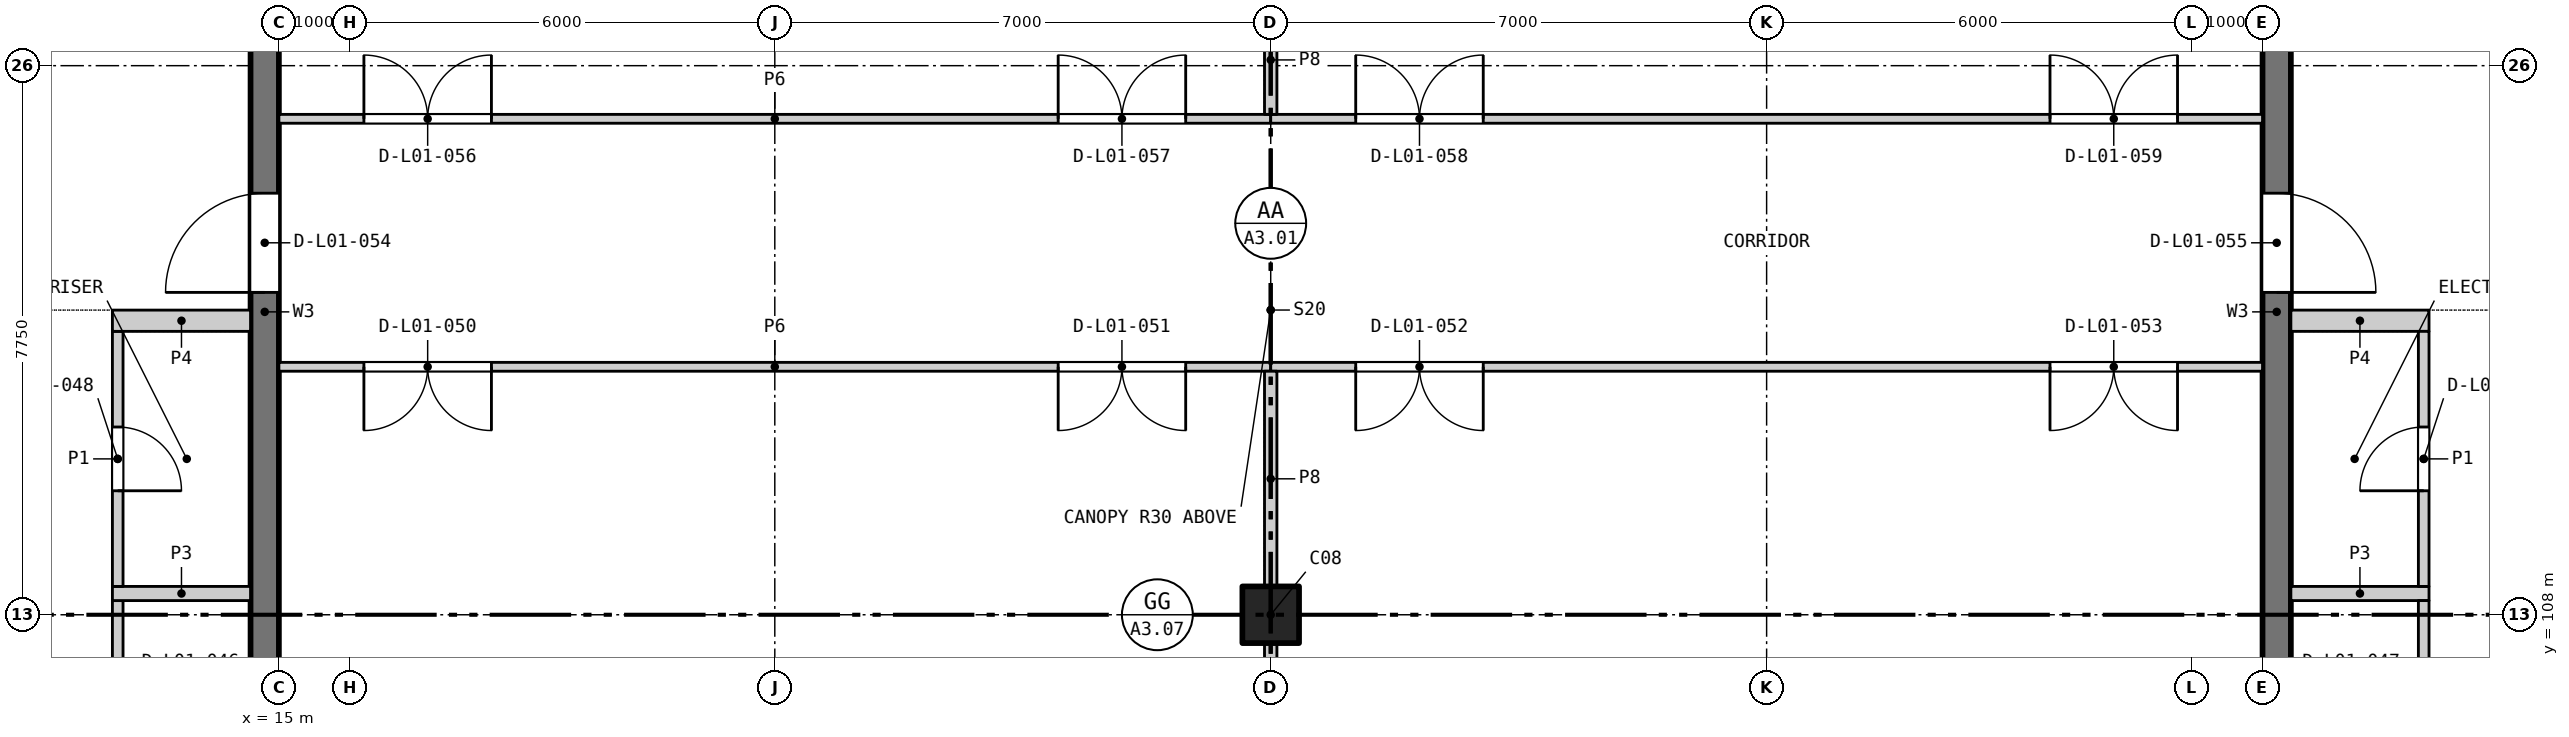
"""IFC4 building model, lengths in metres.
Left out: names, types, materials, properties, quantities, classifications, styles, units other than length and angle.
Written with IfcOpenShell. Run it as: python <this file> out.ifc"""

import sys

from ifc_helpers import new_model, si_unit, direction, frame, frame_2d, origin, origin_2d, place, context, subcontext, project, spatial, rectangle, extrude, element, fill, save


model = new_model("IFC4")
c1 = context("Model", 3, precision=1e-05, world=origin(), true_north=direction((0.0, 1.0)))
c2 = subcontext(c1, "Body", "Model", "MODEL_VIEW")
j1 = project(units=[si_unit("LENGTHUNIT", "METRE"), si_unit("PLANEANGLEUNIT", "RADIAN")], contexts=[c1])
p1 = place(None, origin())
s1 = spatial("IfcSite", under=j1, at=p1, CompositionType="ELEMENT")
p2 = place(p1, origin())
s2 = spatial("IfcBuilding", under=s1, at=p2, CompositionType="ELEMENT")
p3 = place(p2, frame((0.0, 0.0, 6.0)))
s3 = spatial("IfcBuildingStorey", under=s2, at=p3, CompositionType="ELEMENT", Elevation=6.0)
p4 = place(p3, frame((29.0, 108.0, 0.0), z_axis=(0.0, 0.0, 1.0), x_axis=(1.0, 0.0, 0.0)))
e1 = element("IfcColumn", 1, at=p4, inside=s3, PredefinedType="COLUMN", context=c2, shape_type="SweptSolid", body=[
    extrude(rectangle(XDim=0.8, YDim=0.8, at=origin_2d()), origin(), (0.0, 0.0, 1.0), 3.9),
])
p5 = place(p3, frame((14.8, 99.0, 0.0), z_axis=(0.0, 0.0, 1.0), x_axis=(0.0, 1.0, 0.0)))
e2 = element("IfcWall", 2, at=p5, inside=s3, PredefinedType="SHEAR", context=c2, shape_type="SweptSolid", body=[
    extrude(rectangle(XDim=26.55, YDim=0.4, at=frame_2d((13.275, 0.0))), origin(), (0.0, 0.0, 1.0), 4.2),
])
p6 = place(p5, frame((13.55, 0.0, 0.0)))
e3 = element("IfcOpeningElement", 3, at=p6, cuts=e2, PredefinedType="OPENING", context=c2, shape_type="SweptSolid", body=[
    extrude(rectangle(XDim=1.4, YDim=2.4, at=frame_2d((0.7, 1.2))), frame((0.0, 0.21, 0.0), z_axis=(0.0, -1.0, 0.0), x_axis=(1.0, 0.0, 0.0)), (0.0, 0.0, 1.0), 0.42),
])
p7 = place(p3, frame((43.2, 99.0, 0.0), z_axis=(0.0, 0.0, 1.0), x_axis=(0.0, 1.0, 0.0)))
e4 = element("IfcWall", 4, at=p7, inside=s3, PredefinedType="SHEAR", context=c2, shape_type="SweptSolid", body=[
    extrude(rectangle(XDim=26.55, YDim=0.4, at=frame_2d((13.275, 0.0))), origin(), (0.0, 0.0, 1.0), 4.2),
])
p8 = place(p7, frame((13.55, 0.0, 0.0)))
e5 = element("IfcOpeningElement", 5, at=p8, cuts=e4, PredefinedType="OPENING", context=c2, shape_type="SweptSolid", body=[
    extrude(rectangle(XDim=1.4, YDim=2.4, at=frame_2d((0.7, 1.2))), frame((0.0, 0.21, 0.0), z_axis=(0.0, -1.0, 0.0), x_axis=(1.0, 0.0, 0.0)), (0.0, 0.0, 1.0), 0.42),
])
p9 = place(p3, frame((12.725, 104.4, 0.0), z_axis=(0.0, 0.0, 1.0), x_axis=(0.0, 1.0, 0.0)))
e6 = element("IfcWall", 6, at=p9, inside=s3, PredefinedType="PARTITIONING", context=c2, shape_type="SweptSolid", body=[
    extrude(rectangle(XDim=3.8, YDim=0.15, at=frame_2d((1.9, 0.0))), origin(), (0.0, 0.0, 1.0), 3.9),
])
p10 = place(p9, frame((1.45, 0.0, 0.0)))
e7 = element("IfcOpeningElement", 7, at=p10, cuts=e6, PredefinedType="OPENING", context=c2, shape_type="SweptSolid", body=[
    extrude(rectangle(XDim=0.9, YDim=2.1, at=frame_2d((0.45, 1.05))), frame((0.0, 0.085, 0.0), z_axis=(0.0, -1.0, 0.0), x_axis=(1.0, 0.0, 0.0)), (0.0, 0.0, 1.0), 0.17),
])
p11 = place(p3, frame((12.65, 108.3, 0.0), z_axis=(0.0, 0.0, 1.0), x_axis=(1.0, 0.0, 0.0)))
e8 = element("IfcWall", 8, at=p11, inside=s3, PredefinedType="PARTITIONING", context=c2, shape_type="SweptSolid", body=[
    extrude(rectangle(XDim=1.95, YDim=0.2, at=frame_2d((0.975, 0.0))), origin(), (0.0, 0.0, 1.0), 3.9),
])
p12 = place(p3, frame((12.725, 108.4, 0.0), z_axis=(0.0, 0.0, 1.0), x_axis=(0.0, 1.0, 0.0)))
e9 = element("IfcWall", 9, at=p12, inside=s3, PredefinedType="PARTITIONING", context=c2, shape_type="SweptSolid", body=[
    extrude(rectangle(XDim=3.6, YDim=0.15, at=frame_2d((1.8, 0.0))), origin(), (0.0, 0.0, 1.0), 3.9),
])
p13 = place(p12, frame((1.35, 0.0, 0.0)))
e10 = element("IfcOpeningElement", 10, at=p13, cuts=e9, PredefinedType="OPENING", context=c2, shape_type="SweptSolid", body=[
    extrude(rectangle(XDim=0.9, YDim=2.1, at=frame_2d((0.45, 1.05))), frame((0.0, 0.085, 0.0), z_axis=(0.0, -1.0, 0.0), x_axis=(1.0, 0.0, 0.0)), (0.0, 0.0, 1.0), 0.17),
])
p14 = place(p3, frame((12.65, 112.15, 0.0), z_axis=(0.0, 0.0, 1.0), x_axis=(1.0, 0.0, 0.0)))
e11 = element("IfcWall", 11, at=p14, inside=s3, PredefinedType="PARTITIONING", context=c2, shape_type="SweptSolid", body=[
    extrude(rectangle(XDim=1.95, YDim=0.3, at=frame_2d((0.975, 0.0))), origin(), (0.0, 0.0, 1.0), 3.9),
])
p15 = place(p3, frame((43.4, 108.3, 0.0), z_axis=(0.0, 0.0, 1.0), x_axis=(1.0, 0.0, 0.0)))
e12 = element("IfcWall", 12, at=p15, inside=s3, PredefinedType="PARTITIONING", context=c2, shape_type="SweptSolid", body=[
    extrude(rectangle(XDim=1.95, YDim=0.2, at=frame_2d((0.975, 0.0))), origin(), (0.0, 0.0, 1.0), 3.9),
])
p16 = place(p3, frame((43.4, 112.15, 0.0), z_axis=(0.0, 0.0, 1.0), x_axis=(1.0, 0.0, 0.0)))
e13 = element("IfcWall", 13, at=p16, inside=s3, PredefinedType="PARTITIONING", context=c2, shape_type="SweptSolid", body=[
    extrude(rectangle(XDim=1.95, YDim=0.3, at=frame_2d((0.975, 0.0))), origin(), (0.0, 0.0, 1.0), 3.9),
])
p17 = place(p3, frame((45.275, 104.4, 0.0), z_axis=(0.0, 0.0, 1.0), x_axis=(0.0, 1.0, 0.0)))
e14 = element("IfcWall", 14, at=p17, inside=s3, PredefinedType="PARTITIONING", context=c2, shape_type="SweptSolid", body=[
    extrude(rectangle(XDim=3.8, YDim=0.15, at=frame_2d((1.9, 0.0))), origin(), (0.0, 0.0, 1.0), 3.9),
])
p18 = place(p17, frame((1.45, 0.0, 0.0)))
e15 = element("IfcOpeningElement", 15, at=p18, cuts=e14, PredefinedType="OPENING", context=c2, shape_type="SweptSolid", body=[
    extrude(rectangle(XDim=0.9, YDim=2.1, at=frame_2d((0.45, 1.05))), frame((0.0, 0.085, 0.0), z_axis=(0.0, -1.0, 0.0), x_axis=(1.0, 0.0, 0.0)), (0.0, 0.0, 1.0), 0.17),
])
p19 = place(p3, frame((45.275, 108.4, 0.0), z_axis=(0.0, 0.0, 1.0), x_axis=(0.0, 1.0, 0.0)))
e16 = element("IfcWall", 16, at=p19, inside=s3, PredefinedType="PARTITIONING", context=c2, shape_type="SweptSolid", body=[
    extrude(rectangle(XDim=3.6, YDim=0.15, at=frame_2d((1.8, 0.0))), origin(), (0.0, 0.0, 1.0), 3.9),
])
p20 = place(p19, frame((1.35, 0.0, 0.0)))
e17 = element("IfcOpeningElement", 17, at=p20, cuts=e16, PredefinedType="OPENING", context=c2, shape_type="SweptSolid", body=[
    extrude(rectangle(XDim=0.9, YDim=2.1, at=frame_2d((0.45, 1.05))), frame((0.0, 0.085, 0.0), z_axis=(0.0, -1.0, 0.0), x_axis=(1.0, 0.0, 0.0)), (0.0, 0.0, 1.0), 0.17),
])
p21 = place(p3, frame((15.0, 111.5, 0.0), z_axis=(0.0, 0.0, 1.0), x_axis=(1.0, 0.0, 0.0)))
e18 = element("IfcWall", 18, at=p21, inside=s3, PredefinedType="PARTITIONING", context=c2, shape_type="SweptSolid", body=[
    extrude(rectangle(XDim=14.0, YDim=0.125, at=frame_2d((7.0, 0.0))), origin(), (0.0, 0.0, 1.0), 3.9),
])
p22 = place(p21, frame((1.2, 0.0, 0.0)))
e19 = element("IfcOpeningElement", 19, at=p22, cuts=e18, PredefinedType="OPENING", context=c2, shape_type="SweptSolid", body=[
    extrude(rectangle(XDim=1.8, YDim=2.1, at=frame_2d((0.9, 1.05))), frame((0.0, 0.073, 0.0), z_axis=(0.0, -1.0, 0.0), x_axis=(1.0, 0.0, 0.0)), (0.0, 0.0, 1.0), 0.145),
])
p23 = place(p21, frame((11.0, 0.0, 0.0)))
e20 = element("IfcOpeningElement", 20, at=p23, cuts=e18, PredefinedType="OPENING", context=c2, shape_type="SweptSolid", body=[
    extrude(rectangle(XDim=1.8, YDim=2.1, at=frame_2d((0.9, 1.05))), frame((0.0, 0.073, 0.0), z_axis=(0.0, -1.0, 0.0), x_axis=(1.0, 0.0, 0.0)), (0.0, 0.0, 1.0), 0.145),
])
p24 = place(p3, frame((29.0, 111.5, 0.0), z_axis=(0.0, 0.0, 1.0), x_axis=(1.0, 0.0, 0.0)))
e21 = element("IfcWall", 21, at=p24, inside=s3, PredefinedType="PARTITIONING", context=c2, shape_type="SweptSolid", body=[
    extrude(rectangle(XDim=14.0, YDim=0.125, at=frame_2d((7.0, 0.0))), origin(), (0.0, 0.0, 1.0), 3.9),
])
p25 = place(p24, frame((1.2, 0.0, 0.0)))
e22 = element("IfcOpeningElement", 22, at=p25, cuts=e21, PredefinedType="OPENING", context=c2, shape_type="SweptSolid", body=[
    extrude(rectangle(XDim=1.8, YDim=2.1, at=frame_2d((0.9, 1.05))), frame((0.0, 0.073, 0.0), z_axis=(0.0, -1.0, 0.0), x_axis=(1.0, 0.0, 0.0)), (0.0, 0.0, 1.0), 0.145),
])
p26 = place(p24, frame((11.0, 0.0, 0.0)))
e23 = element("IfcOpeningElement", 23, at=p26, cuts=e21, PredefinedType="OPENING", context=c2, shape_type="SweptSolid", body=[
    extrude(rectangle(XDim=1.8, YDim=2.1, at=frame_2d((0.9, 1.05))), frame((0.0, 0.073, 0.0), z_axis=(0.0, -1.0, 0.0), x_axis=(1.0, 0.0, 0.0)), (0.0, 0.0, 1.0), 0.145),
])
p27 = place(p3, frame((15.0, 115.0, 0.0), z_axis=(0.0, 0.0, 1.0), x_axis=(1.0, 0.0, 0.0)))
e24 = element("IfcWall", 24, at=p27, inside=s3, PredefinedType="PARTITIONING", context=c2, shape_type="SweptSolid", body=[
    extrude(rectangle(XDim=14.0, YDim=0.125, at=frame_2d((7.0, 0.0))), origin(), (0.0, 0.0, 1.0), 3.9),
])
p28 = place(p27, frame((1.2, 0.0, 0.0)))
e25 = element("IfcOpeningElement", 25, at=p28, cuts=e24, PredefinedType="OPENING", context=c2, shape_type="SweptSolid", body=[
    extrude(rectangle(XDim=1.8, YDim=2.1, at=frame_2d((0.9, 1.05))), frame((0.0, 0.073, 0.0), z_axis=(0.0, -1.0, 0.0), x_axis=(1.0, 0.0, 0.0)), (0.0, 0.0, 1.0), 0.145),
])
p29 = place(p27, frame((11.0, 0.0, 0.0)))
e26 = element("IfcOpeningElement", 26, at=p29, cuts=e24, PredefinedType="OPENING", context=c2, shape_type="SweptSolid", body=[
    extrude(rectangle(XDim=1.8, YDim=2.1, at=frame_2d((0.9, 1.05))), frame((0.0, 0.073, 0.0), z_axis=(0.0, -1.0, 0.0), x_axis=(1.0, 0.0, 0.0)), (0.0, 0.0, 1.0), 0.145),
])
p30 = place(p3, frame((29.0, 115.0, 0.0), z_axis=(0.0, 0.0, 1.0), x_axis=(1.0, 0.0, 0.0)))
e27 = element("IfcWall", 27, at=p30, inside=s3, PredefinedType="PARTITIONING", context=c2, shape_type="SweptSolid", body=[
    extrude(rectangle(XDim=14.0, YDim=0.125, at=frame_2d((7.0, 0.0))), origin(), (0.0, 0.0, 1.0), 3.9),
])
p31 = place(p30, frame((1.2, 0.0, 0.0)))
e28 = element("IfcOpeningElement", 28, at=p31, cuts=e27, PredefinedType="OPENING", context=c2, shape_type="SweptSolid", body=[
    extrude(rectangle(XDim=1.8, YDim=2.1, at=frame_2d((0.9, 1.05))), frame((0.0, 0.073, 0.0), z_axis=(0.0, -1.0, 0.0), x_axis=(1.0, 0.0, 0.0)), (0.0, 0.0, 1.0), 0.145),
])
p32 = place(p30, frame((11.0, 0.0, 0.0)))
e29 = element("IfcOpeningElement", 29, at=p32, cuts=e27, PredefinedType="OPENING", context=c2, shape_type="SweptSolid", body=[
    extrude(rectangle(XDim=1.8, YDim=2.1, at=frame_2d((0.9, 1.05))), frame((0.0, 0.073, 0.0), z_axis=(0.0, -1.0, 0.0), x_axis=(1.0, 0.0, 0.0)), (0.0, 0.0, 1.0), 0.145),
])
p33 = place(p3, frame((29.0, 100.2, 0.0), z_axis=(0.0, 0.0, 1.0), x_axis=(0.0, 1.0, 0.0)))
e30 = element("IfcWall", 30, at=p33, inside=s3, PredefinedType="PARTITIONING", context=c2, shape_type="SweptSolid", body=[
    extrude(rectangle(XDim=7.4, YDim=0.175, at=frame_2d((3.7, 0.0))), origin(), (0.0, 0.0, 1.0), 2.9),
])
p34 = place(p3, frame((29.0, 108.4, 0.0), z_axis=(0.0, 0.0, 1.0), x_axis=(0.0, 1.0, 0.0)))
e31 = element("IfcWall", 31, at=p34, inside=s3, PredefinedType="PARTITIONING", context=c2, shape_type="SweptSolid", body=[
    extrude(rectangle(XDim=3.038, YDim=0.175, at=frame_2d((1.519, 0.0))), origin(), (0.0, 0.0, 1.0), 2.9),
])
p35 = place(p3, frame((29.0, 115.062, 0.0), z_axis=(0.0, 0.0, 1.0), x_axis=(0.0, 1.0, 0.0)))
e32 = element("IfcWall", 32, at=p35, inside=s3, PredefinedType="PARTITIONING", context=c2, shape_type="SweptSolid", body=[
    extrude(rectangle(XDim=1.538, YDim=0.175, at=frame_2d((0.769, 0.0))), origin(), (0.0, 0.0, 1.0), 2.9),
])
p36 = place(p13, frame((0.9, 0.0, 0.0), z_axis=(0.0, 0.0, 1.0), x_axis=(-1.0, 0.0, 0.0)))
e33 = element("IfcDoor", 33, at=p36, inside=s3, OperationType="SINGLE_SWING_RIGHT", PredefinedType="DOOR", context=c2, shape_type="SweptSolid", body=[
    extrude(rectangle(XDim=0.9, YDim=2.1, at=frame_2d((0.45, 1.05))), frame((0.0, 0.025, 0.0), z_axis=(0.0, -1.0, 0.0), x_axis=(1.0, 0.0, 0.0)), (0.0, 0.0, 1.0), 0.05),
])
fill(e10, e33)
p37 = place(p20, origin())
e34 = element("IfcDoor", 34, at=p37, inside=s3, OperationType="SINGLE_SWING_LEFT", PredefinedType="DOOR", context=c2, shape_type="SweptSolid", body=[
    extrude(rectangle(XDim=0.9, YDim=2.1, at=frame_2d((0.45, 1.05))), frame((0.0, 0.025, 0.0), z_axis=(0.0, -1.0, 0.0), x_axis=(1.0, 0.0, 0.0)), (0.0, 0.0, 1.0), 0.05),
])
fill(e17, e34)
p38 = place(p22, frame((1.8, 0.0, 0.0), z_axis=(0.0, 0.0, 1.0), x_axis=(-1.0, 0.0, 0.0)))
e35 = element("IfcDoor", 35, at=p38, inside=s3, OperationType="DOUBLE_DOOR_SINGLE_SWING", PredefinedType="DOOR", context=c2, shape_type="SweptSolid", body=[
    extrude(rectangle(XDim=1.8, YDim=2.1, at=frame_2d((0.9, 1.05))), frame((0.0, 0.025, 0.0), z_axis=(0.0, -1.0, 0.0), x_axis=(1.0, 0.0, 0.0)), (0.0, 0.0, 1.0), 0.05),
])
fill(e19, e35)
p39 = place(p23, frame((1.8, 0.0, 0.0), z_axis=(0.0, 0.0, 1.0), x_axis=(-1.0, 0.0, 0.0)))
e36 = element("IfcDoor", 36, at=p39, inside=s3, OperationType="DOUBLE_DOOR_SINGLE_SWING", PredefinedType="DOOR", context=c2, shape_type="SweptSolid", body=[
    extrude(rectangle(XDim=1.8, YDim=2.1, at=frame_2d((0.9, 1.05))), frame((0.0, 0.025, 0.0), z_axis=(0.0, -1.0, 0.0), x_axis=(1.0, 0.0, 0.0)), (0.0, 0.0, 1.0), 0.05),
])
fill(e20, e36)
p40 = place(p25, frame((1.8, 0.0, 0.0), z_axis=(0.0, 0.0, 1.0), x_axis=(-1.0, 0.0, 0.0)))
e37 = element("IfcDoor", 37, at=p40, inside=s3, OperationType="DOUBLE_DOOR_SINGLE_SWING", PredefinedType="DOOR", context=c2, shape_type="SweptSolid", body=[
    extrude(rectangle(XDim=1.8, YDim=2.1, at=frame_2d((0.9, 1.05))), frame((0.0, 0.025, 0.0), z_axis=(0.0, -1.0, 0.0), x_axis=(1.0, 0.0, 0.0)), (0.0, 0.0, 1.0), 0.05),
])
fill(e22, e37)
p41 = place(p26, frame((1.8, 0.0, 0.0), z_axis=(0.0, 0.0, 1.0), x_axis=(-1.0, 0.0, 0.0)))
e38 = element("IfcDoor", 38, at=p41, inside=s3, OperationType="DOUBLE_DOOR_SINGLE_SWING", PredefinedType="DOOR", context=c2, shape_type="SweptSolid", body=[
    extrude(rectangle(XDim=1.8, YDim=2.1, at=frame_2d((0.9, 1.05))), frame((0.0, 0.025, 0.0), z_axis=(0.0, -1.0, 0.0), x_axis=(1.0, 0.0, 0.0)), (0.0, 0.0, 1.0), 0.05),
])
fill(e23, e38)
p42 = place(p6, origin())
e39 = element("IfcDoor", 39, at=p42, inside=s3, OperationType="SINGLE_SWING_LEFT", PredefinedType="DOOR", context=c2, shape_type="SweptSolid", body=[
    extrude(rectangle(XDim=1.4, YDim=2.4, at=frame_2d((0.7, 1.2))), frame((0.0, 0.025, 0.0), z_axis=(0.0, -1.0, 0.0), x_axis=(1.0, 0.0, 0.0)), (0.0, 0.0, 1.0), 0.05),
])
fill(e3, e39)
p43 = place(p8, frame((1.4, 0.0, 0.0), z_axis=(0.0, 0.0, 1.0), x_axis=(-1.0, 0.0, 0.0)))
e40 = element("IfcDoor", 40, at=p43, inside=s3, OperationType="SINGLE_SWING_RIGHT", PredefinedType="DOOR", context=c2, shape_type="SweptSolid", body=[
    extrude(rectangle(XDim=1.4, YDim=2.4, at=frame_2d((0.7, 1.2))), frame((0.0, 0.025, 0.0), z_axis=(0.0, -1.0, 0.0), x_axis=(1.0, 0.0, 0.0)), (0.0, 0.0, 1.0), 0.05),
])
fill(e5, e40)
p44 = place(p28, origin())
e41 = element("IfcDoor", 41, at=p44, inside=s3, OperationType="DOUBLE_DOOR_SINGLE_SWING", PredefinedType="DOOR", context=c2, shape_type="SweptSolid", body=[
    extrude(rectangle(XDim=1.8, YDim=2.1, at=frame_2d((0.9, 1.05))), frame((0.0, 0.025, 0.0), z_axis=(0.0, -1.0, 0.0), x_axis=(1.0, 0.0, 0.0)), (0.0, 0.0, 1.0), 0.05),
])
fill(e25, e41)
p45 = place(p29, origin())
e42 = element("IfcDoor", 42, at=p45, inside=s3, OperationType="DOUBLE_DOOR_SINGLE_SWING", PredefinedType="DOOR", context=c2, shape_type="SweptSolid", body=[
    extrude(rectangle(XDim=1.8, YDim=2.1, at=frame_2d((0.9, 1.05))), frame((0.0, 0.025, 0.0), z_axis=(0.0, -1.0, 0.0), x_axis=(1.0, 0.0, 0.0)), (0.0, 0.0, 1.0), 0.05),
])
fill(e26, e42)
p46 = place(p31, origin())
e43 = element("IfcDoor", 43, at=p46, inside=s3, OperationType="DOUBLE_DOOR_SINGLE_SWING", PredefinedType="DOOR", context=c2, shape_type="SweptSolid", body=[
    extrude(rectangle(XDim=1.8, YDim=2.1, at=frame_2d((0.9, 1.05))), frame((0.0, 0.025, 0.0), z_axis=(0.0, -1.0, 0.0), x_axis=(1.0, 0.0, 0.0)), (0.0, 0.0, 1.0), 0.05),
])
fill(e28, e43)
p47 = place(p32, origin())
e44 = element("IfcDoor", 44, at=p47, inside=s3, OperationType="DOUBLE_DOOR_SINGLE_SWING", PredefinedType="DOOR", context=c2, shape_type="SweptSolid", body=[
    extrude(rectangle(XDim=1.8, YDim=2.1, at=frame_2d((0.9, 1.05))), frame((0.0, 0.025, 0.0), z_axis=(0.0, -1.0, 0.0), x_axis=(1.0, 0.0, 0.0)), (0.0, 0.0, 1.0), 0.05),
])
fill(e29, e44)
save(model, sys.argv[1])
